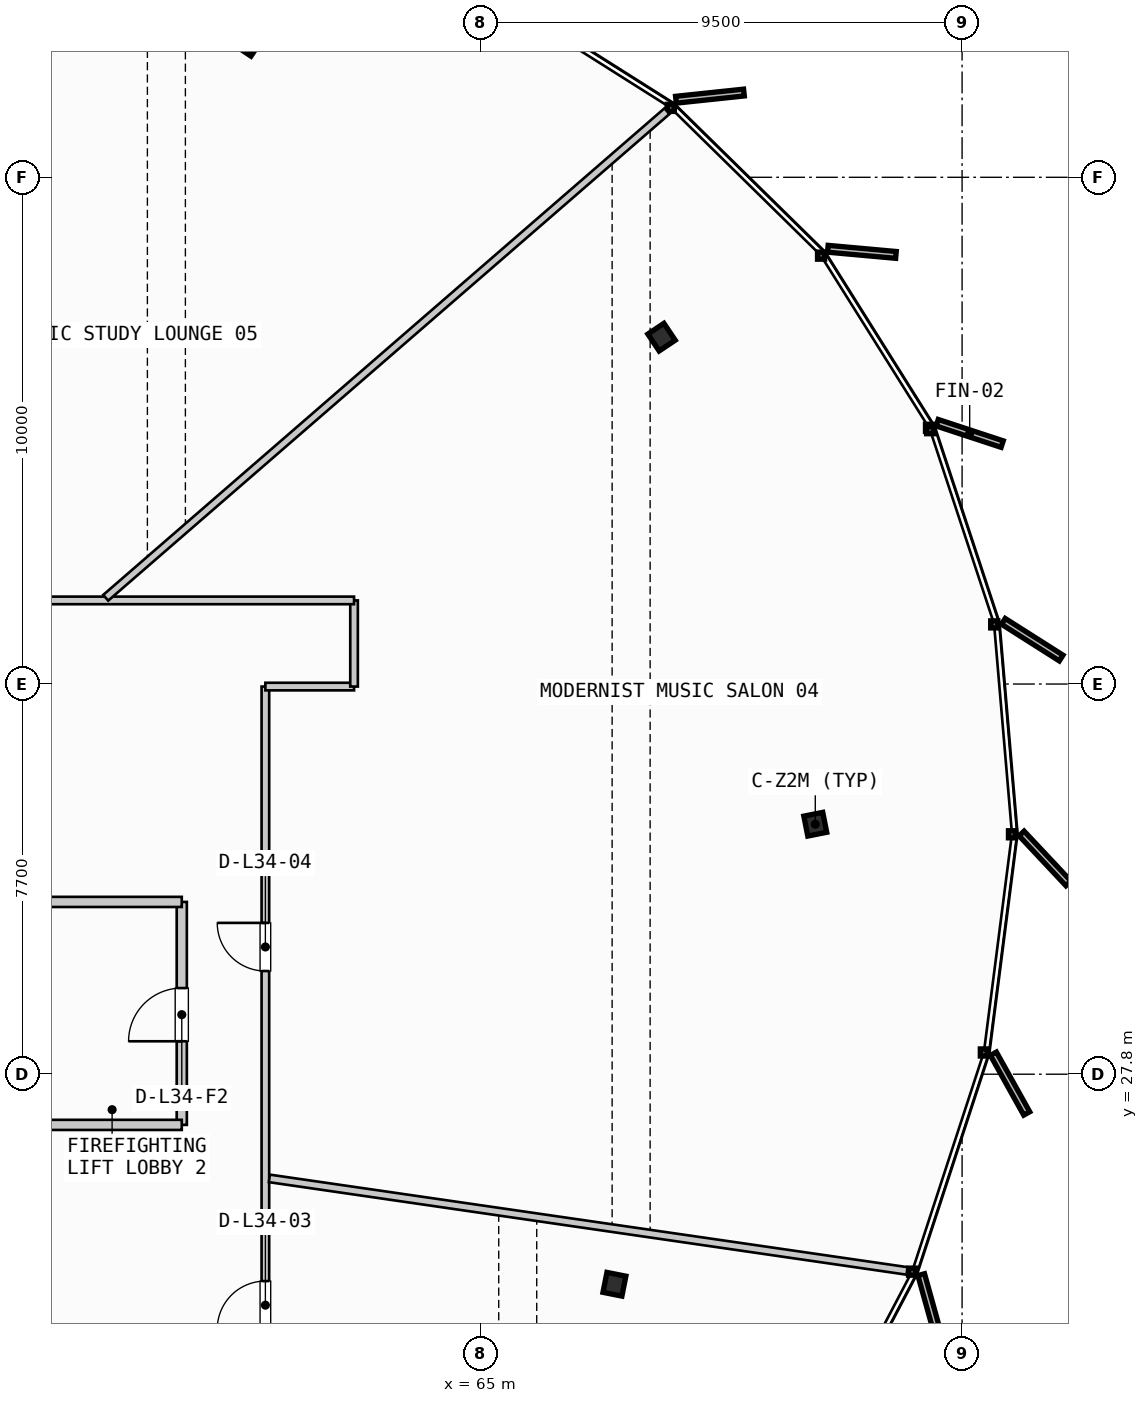
"""IFC4 building model, lengths in metres.
Left out: names, types, materials, properties, quantities, classifications, styles, units other than length and angle.
Written with IfcOpenShell. Run it as: python <this file> out.ifc"""

import sys

from ifc_helpers import new_model, si_unit, direction, frame, frame_2d, origin, origin_2d, place, context, subcontext, project, spatial, rectangle, i_section, extrude, source, transform, mapped, element, fill, save


model = new_model("IFC4")
c1 = context("Model", 3, precision=1e-05, world=origin(), true_north=direction((0.0, 1.0)))
c2 = subcontext(c1, "Body", "Model", "MODEL_VIEW")
j1 = project(units=[si_unit("LENGTHUNIT", "METRE"), si_unit("PLANEANGLEUNIT", "RADIAN")], contexts=[c1])
p1 = place(None, origin())
s1 = spatial("IfcSite", under=j1, at=p1, CompositionType="ELEMENT")
p2 = place(p1, origin())
s2 = spatial("IfcBuilding", under=s1, at=p2, CompositionType="ELEMENT")
p3 = place(p2, frame((0.0, 0.0, 135.9)))
s3 = spatial("IfcBuildingStorey", under=s2, at=p3, CompositionType="ELEMENT", Elevation=135.9)
m1 = source(origin(), c2, "Body", "SweptSolid", [
    extrude(i_section(OverallWidth=0.401, OverallDepth=0.381, WebThickness=0.032, FlangeThickness=0.051, FilletRadius=0.015, at=origin_2d()), origin(), (0.0, 0.0, 1.0), 3.3),
])
for number, where, z_axis, x_axis in (
    (1, (71.603, 32.733, 0.0), (0.0, 0.0, 1.0), (0.981, 0.195, 0.0)),
    (2, (68.569, 42.345, 0.0), (0.0, 0.0, 1.0), (0.831, 0.556, 0.0)),
    (3, (60.405, 48.161, 0.0), (0.0, 0.0, 1.0), (0.556, 0.831, 0.0)),
    (4, (67.639, 23.655, 0.0), (0.0, 0.0, 1.0), (0.981, -0.195, 0.0)),
):
    element("IfcColumn", number, at=place(p3, frame(where, z_axis=z_axis, x_axis=x_axis)), inside=s3, PredefinedType="COLUMN", context=c2, shape_type="MappedRepresentation", body=[
        mapped(m1, transform((0.0, 0.0, 0.0), scale=1.0)),
    ])
p4 = place(p3, frame((59.1, 26.8, 0.0), z_axis=(0.0, 0.0, 1.0), x_axis=(0.0, 1.0, 0.0)))
e5 = element("IfcWall", 5, at=p4, inside=s3, PredefinedType="PARTITIONING", context=c2, shape_type="SweptSolid", body=[
    extrude(rectangle(XDim=4.4, YDim=0.2, at=frame_2d((2.2, 0.0))), origin(), (0.0, 0.0, 1.0), 2.445),
])
p5 = place(p4, frame((1.65, 0.0, 0.0)))
e6 = element("IfcOpeningElement", 6, at=p5, cuts=e5, PredefinedType="OPENING", context=c2, shape_type="SweptSolid", body=[
    extrude(rectangle(XDim=1.05, YDim=2.15, at=frame_2d((0.525, 1.075))), frame((0.0, 0.11, 0.0), z_axis=(0.0, -1.0, 0.0), x_axis=(1.0, 0.0, 0.0)), (0.0, 0.0, 1.0), 0.22),
])
for number, where, z_axis, x_axis in (
    (7, (55.885, 26.8, 0.0), (0.0, 0.0, 1.0), (1.0, 0.0, 0.0)),
    (8, (55.885, 31.2, 0.0), (0.0, 0.0, 1.0), (1.0, 0.0, 0.0)),
):
    element("IfcWall", number, at=place(p3, frame(where, z_axis=z_axis, x_axis=x_axis)), inside=s3, PredefinedType="PARTITIONING", context=c2, shape_type="SweptSolid", body=[
        extrude(rectangle(XDim=3.215, YDim=0.2, at=frame_2d((1.607, 0.0))), origin(), (0.0, 0.0, 1.0), 2.445),
    ])
p6 = place(p3, frame((60.75, 20.15, 0.0), z_axis=(0.0, 0.0, 1.0), x_axis=(0.0, 1.0, 0.0)))
e9 = element("IfcWall", 9, at=p6, inside=s3, PredefinedType="PARTITIONING", context=c2, shape_type="SweptSolid", body=[
    extrude(rectangle(XDim=15.3, YDim=0.15, at=frame_2d((7.65, 0.0))), origin(), (0.0, 0.0, 1.0), 2.445),
])
p7 = place(p6, frame((2.617, 0.0, 0.0)))
e10 = element("IfcOpeningElement", 10, at=p7, cuts=e9, PredefinedType="OPENING", context=c2, shape_type="SweptSolid", body=[
    extrude(rectangle(XDim=0.95, YDim=2.15, at=frame_2d((0.475, 1.075))), frame((0.0, 0.085, 0.0), z_axis=(0.0, -1.0, 0.0), x_axis=(1.0, 0.0, 0.0)), (0.0, 0.0, 1.0), 0.17),
])
p8 = place(p6, frame((9.686, 0.0, 0.0)))
e11 = element("IfcOpeningElement", 11, at=p8, cuts=e9, PredefinedType="OPENING", context=c2, shape_type="SweptSolid", body=[
    extrude(rectangle(XDim=0.95, YDim=2.15, at=frame_2d((0.475, 1.075))), frame((0.0, 0.085, 0.0), z_axis=(0.0, -1.0, 0.0), x_axis=(1.0, 0.0, 0.0)), (0.0, 0.0, 1.0), 0.17),
])
p9 = place(p3, frame((60.75, 35.45, 0.0), z_axis=(0.0, 0.0, 1.0), x_axis=(1.0, 0.0, 0.0)))
e12 = element("IfcWall", 12, at=p9, inside=s3, PredefinedType="PARTITIONING", context=c2, shape_type="SweptSolid", body=[
    extrude(rectangle(XDim=1.75, YDim=0.15, at=frame_2d((0.875, 0.0))), origin(), (0.0, 0.0, 1.0), 2.445),
])
p10 = place(p3, frame((62.5, 35.45, 0.0), z_axis=(0.0, 0.0, 1.0), x_axis=(0.0, 1.0, 0.0)))
e13 = element("IfcWall", 13, at=p10, inside=s3, PredefinedType="PARTITIONING", context=c2, shape_type="SweptSolid", body=[
    extrude(rectangle(XDim=1.7, YDim=0.15, at=frame_2d((0.85, 0.0))), origin(), (0.0, 0.0, 1.0), 2.445),
])
p11 = place(p3, frame((62.5, 37.15, 0.0), z_axis=(0.0, 0.0, 1.0), x_axis=(-1.0, 0.0, 0.0)))
e14 = element("IfcWall", 14, at=p11, inside=s3, PredefinedType="PARTITIONING", context=c2, shape_type="SweptSolid", body=[
    extrude(rectangle(XDim=31.4, YDim=0.15, at=frame_2d((15.7, 0.0))), origin(), (0.0, 0.0, 1.0), 2.445),
])
p12 = place(p11, frame((7.961, 0.0, 0.0)))
e15 = element("IfcOpeningElement", 15, at=p12, cuts=e14, PredefinedType="OPENING", context=c2, shape_type="SweptSolid", body=[
    extrude(rectangle(XDim=0.95, YDim=2.15, at=frame_2d((0.475, 1.075))), frame((0.0, 0.085, 0.0), z_axis=(0.0, -1.0, 0.0), x_axis=(1.0, 0.0, 0.0)), (0.0, 0.0, 1.0), 0.17),
])
p13 = place(p11, frame((15.608, 0.0, 0.0)))
e16 = element("IfcOpeningElement", 16, at=p13, cuts=e14, PredefinedType="OPENING", context=c2, shape_type="SweptSolid", body=[
    extrude(rectangle(XDim=0.95, YDim=2.15, at=frame_2d((0.475, 1.075))), frame((0.0, 0.085, 0.0), z_axis=(0.0, -1.0, 0.0), x_axis=(1.0, 0.0, 0.0)), (0.0, 0.0, 1.0), 0.17),
])
p14 = place(p11, frame((22.904, 0.0, 0.0)))
e17 = element("IfcOpeningElement", 17, at=p14, cuts=e14, PredefinedType="OPENING", context=c2, shape_type="SweptSolid", body=[
    extrude(rectangle(XDim=0.95, YDim=2.15, at=frame_2d((0.475, 1.075))), frame((0.0, 0.085, 0.0), z_axis=(0.0, -1.0, 0.0), x_axis=(1.0, 0.0, 0.0)), (0.0, 0.0, 1.0), 0.17),
])
p15 = place(p3, frame((60.829, 25.744, 0.0), z_axis=(0.0, 0.0, 1.0), x_axis=(0.989638035288, -0.143584675757, 0.0)))
e18 = element("IfcWall", 18, at=p15, inside=s3, PredefinedType="PARTITIONING", context=c2, shape_type="SweptSolid", body=[
    extrude(rectangle(XDim=12.717, YDim=0.15, at=frame_2d((6.358, 0.0))), origin(), (0.0, 0.0, 1.0), 2.445),
])
p16 = place(p3, frame((57.599, 37.202, 0.0), z_axis=(0.0, 0.0, 1.0), x_axis=(0.755590707882, 0.655044030705, 0.0)))
e19 = element("IfcWall", 19, at=p16, inside=s3, PredefinedType="PARTITIONING", context=c2, shape_type="SweptSolid", body=[
    extrude(rectangle(XDim=14.659, YDim=0.15, at=frame_2d((7.329, 0.0))), origin(), (0.0, 0.0, 1.0), 2.445),
])
m2 = source(origin(), c2, "Body", "SweptSolid", [
    extrude(rectangle(XDim=1.05, YDim=2.15, at=frame_2d((0.525, 1.075))), frame((0.0, 0.025, 0.0), z_axis=(0.0, -1.0, 0.0), x_axis=(1.0, 0.0, 0.0)), (0.0, 0.0, 1.0), 0.05),
])
p17 = place(p5, origin())
e20 = element("IfcDoor", 20, at=p17, inside=s3, OperationType="SINGLE_SWING_LEFT", PredefinedType="DOOR", context=c2, shape_type="MappedRepresentation", body=[
    mapped(m2, transform((0.0, 0.0, 0.0), scale=1.0)),
])
fill(e6, e20)
m3 = source(origin(), c2, "Body", "SweptSolid", [
    extrude(rectangle(XDim=0.95, YDim=2.15, at=frame_2d((0.475, 1.075))), frame((0.0, 0.025, 0.0), z_axis=(0.0, -1.0, 0.0), x_axis=(1.0, 0.0, 0.0)), (0.0, 0.0, 1.0), 0.05),
])
p18 = place(p7, origin())
e21 = element("IfcDoor", 21, at=p18, inside=s3, OperationType="SINGLE_SWING_LEFT", PredefinedType="DOOR", context=c2, shape_type="MappedRepresentation", body=[
    mapped(m3, transform((0.0, 0.0, 0.0), scale=1.0)),
])
fill(e10, e21)
p19 = place(p8, origin())
e22 = element("IfcDoor", 22, at=p19, inside=s3, OperationType="SINGLE_SWING_RIGHT", PredefinedType="DOOR", context=c2, shape_type="MappedRepresentation", body=[
    mapped(m3, transform((0.0, 0.0, 0.0), scale=1.0)),
])
fill(e11, e22)
save(model, sys.argv[1])
